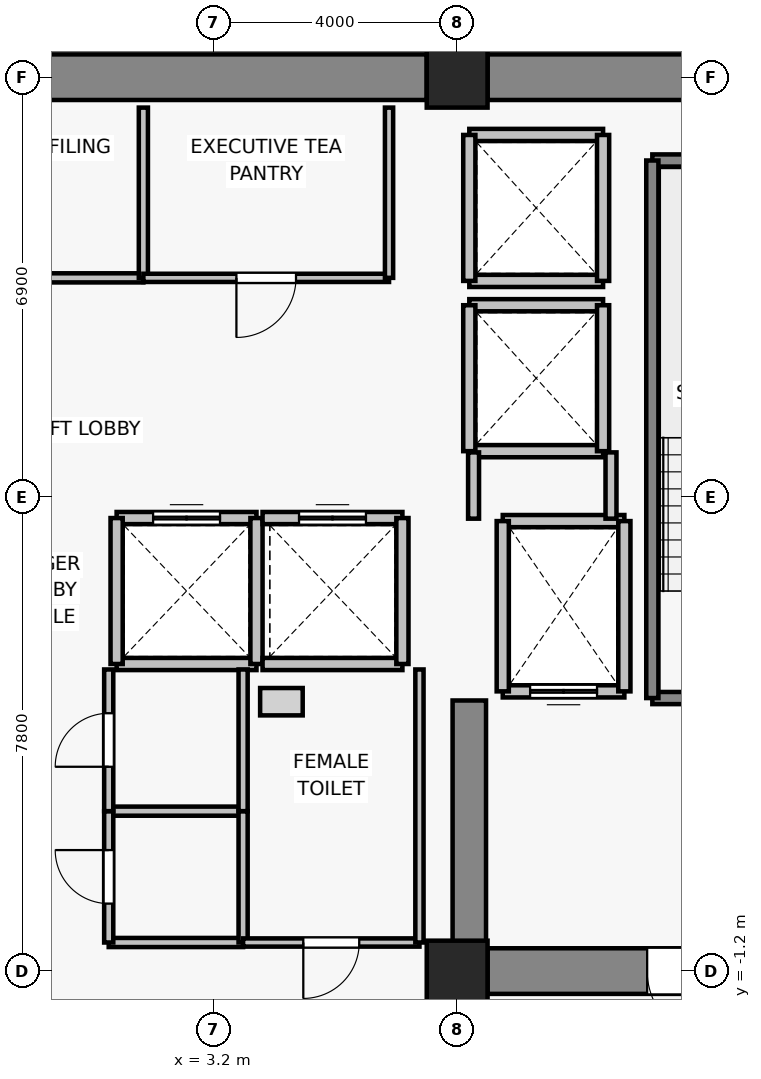
"""IFC4 building model, lengths in metres.
Left out: names, types, materials, properties, quantities, classifications, styles, units other than length and angle.
Written with IfcOpenShell. Run it as: python <this file> out.ifc"""

import sys

from ifc_helpers import new_model, si_unit, direction, frame, frame_2d, origin, origin_2d, place, context, subcontext, project, spatial, rectangle, extrude, source, transform, mapped, element, fill, save


model = new_model("IFC4")
c1 = context("Model", 3, precision=1e-05, world=origin(), true_north=direction((0.0, 1.0)))
c2 = subcontext(c1, "Body", "Model", "MODEL_VIEW")
j1 = project(units=[si_unit("LENGTHUNIT", "METRE"), si_unit("PLANEANGLEUNIT", "RADIAN")], contexts=[c1])
p1 = place(None, origin())
s1 = spatial("IfcSite", under=j1, at=p1, CompositionType="ELEMENT")
p2 = place(p1, origin())
s2 = spatial("IfcBuilding", under=s1, at=p2, CompositionType="ELEMENT")
p3 = place(p2, frame((0.0, 0.0, 195.7)))
s3 = spatial("IfcBuildingStorey", under=s2, at=p3, CompositionType="ELEMENT", Elevation=195.7)
for number, where, z_axis, x_axis in (
    (1, (7.2, -1.2, 0.0), (0.0, 0.0, 1.0), (1.0, 0.0, 0.0)),
    (2, (7.2, 13.5, 0.0), (0.0, 0.0, 1.0), (1.0, 0.0, 0.0)),
):
    element("IfcColumn", number, at=place(p3, frame(where, z_axis=z_axis, x_axis=x_axis)), inside=s3, PredefinedType="COLUMN", context=c2, shape_type="SweptSolid", body=[
        extrude(rectangle(XDim=1.0, YDim=1.0, at=origin_2d()), origin(), (0.0, 0.0, 1.0), 3.3),
    ])
p4 = place(p3, frame((-6.7, 13.5, 0.0), z_axis=(0.0, 0.0, 1.0), x_axis=(1.0, 0.0, 0.0)))
e3 = element("IfcWall", 3, at=p4, inside=s3, PredefinedType="SHEAR", context=c2, shape_type="SweptSolid", body=[
    extrude(rectangle(XDim=13.4, YDim=0.75, at=frame_2d((6.7, 0.0))), origin(), (0.0, 0.0, 1.0), 3.05),
])
p5 = place(p3, frame((7.7, 13.5, 0.0), z_axis=(0.0, 0.0, 1.0), x_axis=(1.0, 0.0, 0.0)))
e4 = element("IfcWall", 4, at=p5, inside=s3, PredefinedType="SHEAR", context=c2, shape_type="SweptSolid", body=[
    extrude(rectangle(XDim=6.2, YDim=0.75, at=frame_2d((3.1, 0.0))), origin(), (0.0, 0.0, 1.0), 3.05),
])
p6 = place(p3, frame((13.9, -1.2, 0.0), z_axis=(0.0, 0.0, 1.0), x_axis=(-1.0, 0.0, 0.0)))
e5 = element("IfcWall", 5, at=p6, inside=s3, PredefinedType="SHEAR", context=c2, shape_type="SweptSolid", body=[
    extrude(rectangle(XDim=6.2, YDim=0.75, at=frame_2d((3.1, 0.0))), origin(), (0.0, 0.0, 1.0), 3.05),
])
p7 = place(p6, frame((2.425, 0.0, 0.0)))
e6 = element("IfcOpeningElement", 6, at=p7, cuts=e5, PredefinedType="OPENING", context=c2, shape_type="SweptSolid", body=[
    extrude(rectangle(XDim=1.15, YDim=2.15, at=frame_2d((0.575, 1.075))), frame((0.0, 0.385, 0.0), z_axis=(0.0, -1.0, 0.0), x_axis=(1.0, 0.0, 0.0)), (0.0, 0.0, 1.0), 0.77),
])
p8 = place(p3, frame((7.4, -0.825, 0.0), z_axis=(0.0, 0.0, 1.0), x_axis=(0.0, 1.0, 0.0)))
e7 = element("IfcWall", 7, at=p8, inside=s3, PredefinedType="SHEAR", context=c2, shape_type="SweptSolid", body=[
    extrude(rectangle(XDim=4.075, YDim=0.55, at=frame_2d((2.038, 0.0))), origin(), (0.0, 0.0, 1.0), 3.05),
])
p9 = place(p3, frame((9.95, 3.4, 0.0), z_axis=(0.0, 0.0, 1.0), x_axis=(-1.0, 0.0, 0.0)))
e8 = element("IfcWall", 8, at=p9, inside=s3, PredefinedType="SOLIDWALL", context=c2, shape_type="SweptSolid", body=[
    extrude(rectangle(XDim=2.0, YDim=0.2, at=frame_2d((1.0, 0.0))), origin(), (0.0, 0.0, 1.0), 3.05),
])
p10 = place(p9, frame((0.45, 0.0, 0.0)))
e9 = element("IfcOpeningElement", 9, at=p10, cuts=e8, PredefinedType="OPENING", context=c2, shape_type="SweptSolid", body=[
    extrude(rectangle(XDim=1.1, YDim=2.2, at=frame_2d((0.55, 1.1))), frame((0.0, 0.11, 0.0), z_axis=(0.0, -1.0, 0.0), x_axis=(1.0, 0.0, 0.0)), (0.0, 0.0, 1.0), 0.22),
])
p11 = place(p3, frame((7.95, 6.2, 0.0), z_axis=(0.0, 0.0, 1.0), x_axis=(1.0, 0.0, 0.0)))
e10 = element("IfcWall", 10, at=p11, inside=s3, PredefinedType="SOLIDWALL", context=c2, shape_type="SweptSolid", body=[
    extrude(rectangle(XDim=2.0, YDim=0.2, at=frame_2d((1.0, 0.0))), origin(), (0.0, 0.0, 1.0), 3.05),
])
for number, where, z_axis, x_axis in (
    (11, (7.95, 3.4, 0.0), (0.0, 0.0, 1.0), (0.0, 1.0, 0.0)),
    (12, (9.95, 6.2, 0.0), (0.0, 0.0, 1.0), (0.0, -1.0, 0.0)),
):
    element("IfcWall", number, at=place(p3, frame(where, z_axis=z_axis, x_axis=x_axis)), inside=s3, PredefinedType="SOLIDWALL", context=c2, shape_type="SweptSolid", body=[
        extrude(rectangle(XDim=2.8, YDim=0.2, at=frame_2d((1.4, 0.0))), origin(), (0.0, 0.0, 1.0), 3.05),
    ])
p12 = place(p3, frame((3.9, 3.85, 0.0), z_axis=(0.0, 0.0, 1.0), x_axis=(-1.0, 0.0, 0.0)))
e13 = element("IfcWall", 13, at=p12, inside=s3, PredefinedType="SOLIDWALL", context=c2, shape_type="SweptSolid", body=[
    extrude(rectangle(XDim=2.3, YDim=0.2, at=frame_2d((1.15, 0.0))), origin(), (0.0, 0.0, 1.0), 3.05),
])
p13 = place(p3, frame((1.6, 6.25, 0.0), z_axis=(0.0, 0.0, 1.0), x_axis=(1.0, 0.0, 0.0)))
e14 = element("IfcWall", 14, at=p13, inside=s3, PredefinedType="SOLIDWALL", context=c2, shape_type="SweptSolid", body=[
    extrude(rectangle(XDim=2.3, YDim=0.2, at=frame_2d((1.15, 0.0))), origin(), (0.0, 0.0, 1.0), 3.05),
])
p14 = place(p13, frame((0.6, 0.0, 0.0)))
e15 = element("IfcOpeningElement", 15, at=p14, cuts=e14, PredefinedType="OPENING", context=c2, shape_type="SweptSolid", body=[
    extrude(rectangle(XDim=1.1, YDim=2.2, at=frame_2d((0.55, 1.1))), frame((0.0, 0.11, 0.0), z_axis=(0.0, -1.0, 0.0), x_axis=(1.0, 0.0, 0.0)), (0.0, 0.0, 1.0), 0.22),
])
for number, where, z_axis, x_axis in (
    (16, (1.6, 3.85, 0.0), (0.0, 0.0, 1.0), (0.0, 1.0, 0.0)),
    (17, (3.9, 6.25, 0.0), (0.0, 0.0, 1.0), (0.0, -1.0, 0.0)),
):
    element("IfcWall", number, at=place(p3, frame(where, z_axis=z_axis, x_axis=x_axis)), inside=s3, PredefinedType="SOLIDWALL", context=c2, shape_type="SweptSolid", body=[
        extrude(rectangle(XDim=2.4, YDim=0.2, at=frame_2d((1.2, 0.0))), origin(), (0.0, 0.0, 1.0), 3.05),
    ])
p15 = place(p3, frame((6.3, 3.85, 0.0), z_axis=(0.0, 0.0, 1.0), x_axis=(-1.0, 0.0, 0.0)))
e18 = element("IfcWall", 18, at=p15, inside=s3, PredefinedType="SOLIDWALL", context=c2, shape_type="SweptSolid", body=[
    extrude(rectangle(XDim=2.3, YDim=0.2, at=frame_2d((1.15, 0.0))), origin(), (0.0, 0.0, 1.0), 3.05),
])
p16 = place(p3, frame((4.0, 6.25, 0.0), z_axis=(0.0, 0.0, 1.0), x_axis=(1.0, 0.0, 0.0)))
e19 = element("IfcWall", 19, at=p16, inside=s3, PredefinedType="SOLIDWALL", context=c2, shape_type="SweptSolid", body=[
    extrude(rectangle(XDim=2.3, YDim=0.2, at=frame_2d((1.15, 0.0))), origin(), (0.0, 0.0, 1.0), 3.05),
])
p17 = place(p16, frame((0.6, 0.0, 0.0)))
e20 = element("IfcOpeningElement", 20, at=p17, cuts=e19, PredefinedType="OPENING", context=c2, shape_type="SweptSolid", body=[
    extrude(rectangle(XDim=1.1, YDim=2.2, at=frame_2d((0.55, 1.1))), frame((0.0, 0.11, 0.0), z_axis=(0.0, -1.0, 0.0), x_axis=(1.0, 0.0, 0.0)), (0.0, 0.0, 1.0), 0.22),
])
p18 = place(p3, frame((6.3, 6.25, 0.0), z_axis=(0.0, 0.0, 1.0), x_axis=(0.0, -1.0, 0.0)))
e21 = element("IfcWall", 21, at=p18, inside=s3, PredefinedType="SOLIDWALL", context=c2, shape_type="SweptSolid", body=[
    extrude(rectangle(XDim=2.4, YDim=0.2, at=frame_2d((1.2, 0.0))), origin(), (0.0, 0.0, 1.0), 3.05),
])
for number, where, z_axis, x_axis in (
    (22, (9.6, 7.35, 0.0), (0.0, 0.0, 1.0), (-1.0, 0.0, 0.0)),
    (23, (7.4, 9.75, 0.0), (0.0, 0.0, 1.0), (1.0, 0.0, 0.0)),
):
    element("IfcWall", number, at=place(p3, frame(where, z_axis=z_axis, x_axis=x_axis)), inside=s3, PredefinedType="SOLIDWALL", context=c2, shape_type="SweptSolid", body=[
        extrude(rectangle(XDim=2.2, YDim=0.2, at=frame_2d((1.1, 0.0))), origin(), (0.0, 0.0, 1.0), 2.54),
    ])
p19 = place(p3, frame((7.4, 7.35, 0.0), z_axis=(0.0, 0.0, 1.0), x_axis=(0.0, 1.0, 0.0)))
e24 = element("IfcWall", 24, at=p19, inside=s3, PredefinedType="SOLIDWALL", context=c2, shape_type="SweptSolid", body=[
    extrude(rectangle(XDim=2.4, YDim=0.2, at=frame_2d((1.2, 0.0))), origin(), (0.0, 0.0, 1.0), 2.54),
])
p20 = place(p3, frame((9.6, 9.75, 0.0), z_axis=(0.0, 0.0, 1.0), x_axis=(0.0, -1.0, 0.0)))
e25 = element("IfcWall", 25, at=p20, inside=s3, PredefinedType="SOLIDWALL", context=c2, shape_type="SweptSolid", body=[
    extrude(rectangle(XDim=2.4, YDim=0.2, at=frame_2d((1.2, 0.0))), origin(), (0.0, 0.0, 1.0), 3.05),
])
for number, where, z_axis, x_axis in (
    (26, (9.6, 10.15, 0.0), (0.0, 0.0, 1.0), (-1.0, 0.0, 0.0)),
    (27, (7.4, 12.55, 0.0), (0.0, 0.0, 1.0), (1.0, 0.0, 0.0)),
):
    element("IfcWall", number, at=place(p3, frame(where, z_axis=z_axis, x_axis=x_axis)), inside=s3, PredefinedType="SOLIDWALL", context=c2, shape_type="SweptSolid", body=[
        extrude(rectangle(XDim=2.2, YDim=0.2, at=frame_2d((1.1, 0.0))), origin(), (0.0, 0.0, 1.0), 2.54),
    ])
p21 = place(p3, frame((7.4, 10.15, 0.0), z_axis=(0.0, 0.0, 1.0), x_axis=(0.0, 1.0, 0.0)))
e28 = element("IfcWall", 28, at=p21, inside=s3, PredefinedType="SOLIDWALL", context=c2, shape_type="SweptSolid", body=[
    extrude(rectangle(XDim=2.4, YDim=0.2, at=frame_2d((1.2, 0.0))), origin(), (0.0, 0.0, 1.0), 2.54),
])
p22 = place(p3, frame((9.6, 12.55, 0.0), z_axis=(0.0, 0.0, 1.0), x_axis=(0.0, -1.0, 0.0)))
e29 = element("IfcWall", 29, at=p22, inside=s3, PredefinedType="SOLIDWALL", context=c2, shape_type="SweptSolid", body=[
    extrude(rectangle(XDim=2.4, YDim=0.2, at=frame_2d((1.2, 0.0))), origin(), (0.0, 0.0, 1.0), 3.05),
])
p23 = place(p3, frame((13.93, 3.29, 0.0), z_axis=(0.0, 0.0, 1.0), x_axis=(-1.0, 0.0, 0.0)))
e30 = element("IfcWall", 30, at=p23, inside=s3, PredefinedType="SOLIDWALL", context=c2, shape_type="SweptSolid", body=[
    extrude(rectangle(XDim=3.52, YDim=0.2, at=frame_2d((1.76, 0.0))), origin(), (0.0, 0.0, 1.0), 3.05),
])
p24 = place(p23, frame((1.205, 0.0, 0.0)))
e31 = element("IfcOpeningElement", 31, at=p24, cuts=e30, PredefinedType="OPENING", context=c2, shape_type="SweptSolid", body=[
    extrude(rectangle(XDim=1.15, YDim=2.15, at=frame_2d((0.575, 1.075))), frame((0.0, 0.11, 0.0), z_axis=(0.0, -1.0, 0.0), x_axis=(1.0, 0.0, 0.0)), (0.0, 0.0, 1.0), 0.22),
])
p25 = place(p3, frame((10.41, 12.13, 0.0), z_axis=(0.0, 0.0, 1.0), x_axis=(1.0, 0.0, 0.0)))
e32 = element("IfcWall", 32, at=p25, inside=s3, PredefinedType="SOLIDWALL", context=c2, shape_type="SweptSolid", body=[
    extrude(rectangle(XDim=3.52, YDim=0.2, at=frame_2d((1.76, 0.0))), origin(), (0.0, 0.0, 1.0), 3.05),
])
p26 = place(p3, frame((10.41, 3.29, 0.0), z_axis=(0.0, 0.0, 1.0), x_axis=(0.0, 1.0, 0.0)))
e33 = element("IfcWall", 33, at=p26, inside=s3, PredefinedType="SOLIDWALL", context=c2, shape_type="SweptSolid", body=[
    extrude(rectangle(XDim=8.84, YDim=0.2, at=frame_2d((4.42, 0.0))), origin(), (0.0, 0.0, 1.0), 3.05),
])
p27 = place(p3, frame((7.47, 6.24, 0.0), z_axis=(0.0, 0.0, 1.0), x_axis=(0.0, 1.0, 0.0)))
e34 = element("IfcWall", 34, at=p27, inside=s3, PredefinedType="PARTITIONING", context=c2, shape_type="SweptSolid", body=[
    extrude(rectangle(XDim=1.09, YDim=0.18, at=frame_2d((0.545, 0.0))), origin(), (0.0, 0.0, 1.0), 2.54),
])
p28 = place(p3, frame((9.73, 7.33, 0.0), z_axis=(0.0, 0.0, 1.0), x_axis=(0.0, -1.0, 0.0)))
e35 = element("IfcWall", 35, at=p28, inside=s3, PredefinedType="PARTITIONING", context=c2, shape_type="SweptSolid", body=[
    extrude(rectangle(XDim=1.09, YDim=0.18, at=frame_2d((0.545, 0.0))), origin(), (0.0, 0.0, 1.0), 3.05),
])
p29 = place(p3, frame((2.04, 10.2, 0.0), z_axis=(0.0, 0.0, 1.0), x_axis=(-1.0, 0.0, 0.0)))
e36 = element("IfcWall", 36, at=p29, inside=s3, PredefinedType="PARTITIONING", context=c2, shape_type="SweptSolid", body=[
    extrude(rectangle(XDim=4.16, YDim=0.15, at=frame_2d((2.08, 0.0))), origin(), (0.0, 0.0, 1.0), 3.05),
])
p30 = place(p29, frame((1.55, 0.0, 0.0)))
e37 = element("IfcOpeningElement", 37, at=p30, cuts=e36, PredefinedType="OPENING", context=c2, shape_type="SweptSolid", body=[
    extrude(rectangle(XDim=0.98, YDim=2.15, at=frame_2d((0.49, 1.075))), frame((0.0, 0.085, 0.0), z_axis=(0.0, -1.0, 0.0), x_axis=(1.0, 0.0, 0.0)), (0.0, 0.0, 1.0), 0.17),
])
p31 = place(p3, frame((2.04, 13.0, 0.0), z_axis=(0.0, 0.0, 1.0), x_axis=(0.0, -1.0, 0.0)))
e38 = element("IfcWall", 38, at=p31, inside=s3, PredefinedType="PARTITIONING", context=c2, shape_type="SweptSolid", body=[
    extrude(rectangle(XDim=2.8, YDim=0.15, at=frame_2d((1.4, 0.0))), origin(), (0.0, 0.0, 1.0), 3.05),
])
p32 = place(p3, frame((6.08, 10.2, 0.0), z_axis=(0.0, 0.0, 1.0), x_axis=(-1.0, 0.0, 0.0)))
e39 = element("IfcWall", 39, at=p32, inside=s3, PredefinedType="PARTITIONING", context=c2, shape_type="SweptSolid", body=[
    extrude(rectangle(XDim=4.04, YDim=0.135, at=frame_2d((2.02, 0.0))), origin(), (0.0, 0.0, 1.0), 3.05),
])
p33 = place(p32, frame((1.53, 0.0, 0.0)))
e40 = element("IfcOpeningElement", 40, at=p33, cuts=e39, PredefinedType="OPENING", context=c2, shape_type="SweptSolid", body=[
    extrude(rectangle(XDim=0.98, YDim=2.15, at=frame_2d((0.49, 1.075))), frame((0.0, 0.077, 0.0), z_axis=(0.0, -1.0, 0.0), x_axis=(1.0, 0.0, 0.0)), (0.0, 0.0, 1.0), 0.155),
])
p34 = place(p3, frame((6.08, 13.0, 0.0), z_axis=(0.0, 0.0, 1.0), x_axis=(0.0, -1.0, 0.0)))
e41 = element("IfcWall", 41, at=p34, inside=s3, PredefinedType="PARTITIONING", context=c2, shape_type="SweptSolid", body=[
    extrude(rectangle(XDim=2.8, YDim=0.135, at=frame_2d((1.4, 0.0))), origin(), (0.0, 0.0, 1.0), 3.05),
])
for number, where, z_axis, x_axis in (
    (42, (3.68, -0.73, 0.0), (0.0, 0.0, 1.0), (-1.0, 0.0, 0.0)),
    (43, (1.47, 1.43, 0.0), (0.0, 0.0, 1.0), (1.0, 0.0, 0.0)),
):
    element("IfcWall", number, at=place(p3, frame(where, z_axis=z_axis, x_axis=x_axis)), inside=s3, PredefinedType="PARTITIONING", context=c2, shape_type="SweptSolid", body=[
        extrude(rectangle(XDim=2.21, YDim=0.15, at=frame_2d((1.105, 0.0))), origin(), (0.0, 0.0, 1.0), 3.05),
    ])
p35 = place(p3, frame((1.47, -0.73, 0.0), z_axis=(0.0, 0.0, 1.0), x_axis=(0.0, 1.0, 0.0)))
e44 = element("IfcWall", 44, at=p35, inside=s3, PredefinedType="PARTITIONING", context=c2, shape_type="SweptSolid", body=[
    extrude(rectangle(XDim=2.16, YDim=0.15, at=frame_2d((1.08, 0.0))), origin(), (0.0, 0.0, 1.0), 3.05),
])
p36 = place(p35, frame((0.64, 0.0, 0.0)))
e45 = element("IfcOpeningElement", 45, at=p36, cuts=e44, PredefinedType="OPENING", context=c2, shape_type="SweptSolid", body=[
    extrude(rectangle(XDim=0.88, YDim=2.1, at=frame_2d((0.44, 1.05))), frame((0.0, 0.085, 0.0), z_axis=(0.0, -1.0, 0.0), x_axis=(1.0, 0.0, 0.0)), (0.0, 0.0, 1.0), 0.17),
])
p37 = place(p3, frame((3.68, 1.43, 0.0), z_axis=(0.0, 0.0, 1.0), x_axis=(0.0, -1.0, 0.0)))
e46 = element("IfcWall", 46, at=p37, inside=s3, PredefinedType="PARTITIONING", context=c2, shape_type="SweptSolid", body=[
    extrude(rectangle(XDim=2.16, YDim=0.15, at=frame_2d((1.08, 0.0))), origin(), (0.0, 0.0, 1.0), 3.05),
])
p38 = place(p3, frame((1.47, 1.43, 0.0), z_axis=(0.0, 0.0, 1.0), x_axis=(0.0, 1.0, 0.0)))
e47 = element("IfcWall", 47, at=p38, inside=s3, PredefinedType="PARTITIONING", context=c2, shape_type="SweptSolid", body=[
    extrude(rectangle(XDim=2.33, YDim=0.15, at=frame_2d((1.165, 0.0))), origin(), (0.0, 0.0, 1.0), 3.05),
])
p39 = place(p38, frame((0.73, 0.0, 0.0)))
e48 = element("IfcOpeningElement", 48, at=p39, cuts=e47, PredefinedType="OPENING", context=c2, shape_type="SweptSolid", body=[
    extrude(rectangle(XDim=0.88, YDim=2.15, at=frame_2d((0.44, 1.075))), frame((0.0, 0.085, 0.0), z_axis=(0.0, -1.0, 0.0), x_axis=(1.0, 0.0, 0.0)), (0.0, 0.0, 1.0), 0.17),
])
p40 = place(p3, frame((3.68, 3.76, 0.0), z_axis=(0.0, 0.0, 1.0), x_axis=(0.0, -1.0, 0.0)))
e49 = element("IfcWall", 49, at=p40, inside=s3, PredefinedType="PARTITIONING", context=c2, shape_type="SweptSolid", body=[
    extrude(rectangle(XDim=2.33, YDim=0.15, at=frame_2d((1.165, 0.0))), origin(), (0.0, 0.0, 1.0), 3.05),
])
p41 = place(p3, frame((6.58, -0.73, 0.0), z_axis=(0.0, 0.0, 1.0), x_axis=(-1.0, 0.0, 0.0)))
e50 = element("IfcWall", 50, at=p41, inside=s3, PredefinedType="PARTITIONING", context=c2, shape_type="SweptSolid", body=[
    extrude(rectangle(XDim=2.9, YDim=0.135, at=frame_2d((1.45, 0.0))), origin(), (0.0, 0.0, 1.0), 3.05),
])
p42 = place(p41, frame((0.99, 0.0, 0.0)))
e51 = element("IfcOpeningElement", 51, at=p42, cuts=e50, PredefinedType="OPENING", context=c2, shape_type="SweptSolid", body=[
    extrude(rectangle(XDim=0.92, YDim=2.1, at=frame_2d((0.46, 1.05))), frame((0.0, 0.077, 0.0), z_axis=(0.0, -1.0, 0.0), x_axis=(1.0, 0.0, 0.0)), (0.0, 0.0, 1.0), 0.155),
])
p43 = place(p3, frame((6.58, 3.76, 0.0), z_axis=(0.0, 0.0, 1.0), x_axis=(0.0, -1.0, 0.0)))
e52 = element("IfcWall", 52, at=p43, inside=s3, PredefinedType="PARTITIONING", context=c2, shape_type="SweptSolid", body=[
    extrude(rectangle(XDim=4.49, YDim=0.135, at=frame_2d((2.245, 0.0))), origin(), (0.0, 0.0, 1.0), 3.05),
])
m1 = source(origin(), c2, "Body", "SweptSolid", [
    extrude(rectangle(XDim=1.1, YDim=2.2, at=frame_2d((0.55, 1.1))), frame((0.0, 0.025, 0.0), z_axis=(0.0, -1.0, 0.0), x_axis=(1.0, 0.0, 0.0)), (0.0, 0.0, 1.0), 0.05),
])
p44 = place(p10, origin())
e53 = element("IfcDoor", 53, at=p44, inside=s3, OperationType="DOUBLE_DOOR_SLIDING", PredefinedType="DOOR", context=c2, shape_type="MappedRepresentation", body=[
    mapped(m1, transform((0.0, 0.0, 0.0), x_axis=(1.0, 0.0, 0.0), y_axis=(0.0, 1.0, 0.0), z_axis=(0.0, 0.0, 1.0), scale=1.0)),
])
fill(e9, e53)
p45 = place(p14, origin())
e54 = element("IfcDoor", 54, at=p45, inside=s3, OperationType="DOUBLE_DOOR_SLIDING", PredefinedType="DOOR", context=c2, shape_type="MappedRepresentation", body=[
    mapped(m1, transform((0.0, 0.0, 0.0), x_axis=(1.0, 0.0, 0.0), y_axis=(0.0, 1.0, 0.0), z_axis=(0.0, 0.0, 1.0), scale=1.0)),
])
fill(e15, e54)
p46 = place(p17, origin())
e55 = element("IfcDoor", 55, at=p46, inside=s3, OperationType="DOUBLE_DOOR_SLIDING", PredefinedType="DOOR", context=c2, shape_type="MappedRepresentation", body=[
    mapped(m1, transform((0.0, 0.0, 0.0), x_axis=(1.0, 0.0, 0.0), y_axis=(0.0, 1.0, 0.0), z_axis=(0.0, 0.0, 1.0), scale=1.0)),
])
fill(e20, e55)
m2 = source(origin(), c2, "Body", "SweptSolid", [
    extrude(rectangle(XDim=1.15, YDim=2.15, at=frame_2d((0.575, 1.075))), frame((0.0, 0.025, 0.0), z_axis=(0.0, -1.0, 0.0), x_axis=(1.0, 0.0, 0.0)), (0.0, 0.0, 1.0), 0.05),
])
p47 = place(p7, origin())
e56 = element("IfcDoor", 56, at=p47, inside=s3, OperationType="SINGLE_SWING_LEFT", PredefinedType="DOOR", context=c2, shape_type="MappedRepresentation", body=[
    mapped(m2, transform((0.0, 0.0, 0.0), x_axis=(1.0, 0.0, 0.0), y_axis=(0.0, 1.0, 0.0), z_axis=(0.0, 0.0, 1.0), scale=1.0)),
])
fill(e6, e56)
m3 = source(origin(), c2, "Body", "SweptSolid", [
    extrude(rectangle(XDim=0.98, YDim=2.15, at=frame_2d((0.49, 1.075))), frame((0.0, 0.025, 0.0), z_axis=(0.0, -1.0, 0.0), x_axis=(1.0, 0.0, 0.0)), (0.0, 0.0, 1.0), 0.05),
])
p48 = place(p33, origin())
e57 = element("IfcDoor", 57, at=p48, inside=s3, OperationType="SINGLE_SWING_RIGHT", PredefinedType="DOOR", context=c2, shape_type="MappedRepresentation", body=[
    mapped(m3, transform((0.0, 0.0, 0.0), x_axis=(1.0, 0.0, 0.0), y_axis=(0.0, 1.0, 0.0), z_axis=(0.0, 0.0, 1.0), scale=1.0)),
])
fill(e40, e57)
m4 = source(origin(), c2, "Body", "SweptSolid", [
    extrude(rectangle(XDim=0.88, YDim=2.1, at=frame_2d((0.44, 1.05))), frame((0.0, 0.025, 0.0), z_axis=(0.0, -1.0, 0.0), x_axis=(1.0, 0.0, 0.0)), (0.0, 0.0, 1.0), 0.05),
])
p49 = place(p36, origin())
e58 = element("IfcDoor", 58, at=p49, inside=s3, OperationType="SINGLE_SWING_RIGHT", PredefinedType="DOOR", context=c2, shape_type="MappedRepresentation", body=[
    mapped(m4, transform((0.0, 0.0, 0.0), x_axis=(1.0, 0.0, 0.0), y_axis=(0.0, 1.0, 0.0), z_axis=(0.0, 0.0, 1.0), scale=1.0)),
])
fill(e45, e58)
m5 = source(origin(), c2, "Body", "SweptSolid", [
    extrude(rectangle(XDim=0.88, YDim=2.15, at=frame_2d((0.44, 1.075))), frame((0.0, 0.025, 0.0), z_axis=(0.0, -1.0, 0.0), x_axis=(1.0, 0.0, 0.0)), (0.0, 0.0, 1.0), 0.05),
])
p50 = place(p39, origin())
e59 = element("IfcDoor", 59, at=p50, inside=s3, OperationType="SINGLE_SWING_LEFT", PredefinedType="DOOR", context=c2, shape_type="MappedRepresentation", body=[
    mapped(m5, transform((0.0, 0.0, 0.0), x_axis=(1.0, 0.0, 0.0), y_axis=(0.0, 1.0, 0.0), z_axis=(0.0, 0.0, 1.0), scale=1.0)),
])
fill(e48, e59)
m6 = source(origin(), c2, "Body", "SweptSolid", [
    extrude(rectangle(XDim=0.92, YDim=2.1, at=frame_2d((0.46, 1.05))), frame((0.0, 0.025, 0.0), z_axis=(0.0, -1.0, 0.0), x_axis=(1.0, 0.0, 0.0)), (0.0, 0.0, 1.0), 0.05),
])
p51 = place(p42, origin())
e60 = element("IfcDoor", 60, at=p51, inside=s3, OperationType="SINGLE_SWING_RIGHT", PredefinedType="DOOR", context=c2, shape_type="MappedRepresentation", body=[
    mapped(m6, transform((0.0, 0.0, 0.0), x_axis=(1.0, 0.0, 0.0), y_axis=(0.0, 1.0, 0.0), z_axis=(0.0, 0.0, 1.0), scale=1.0)),
])
fill(e51, e60)
save(model, sys.argv[1])
